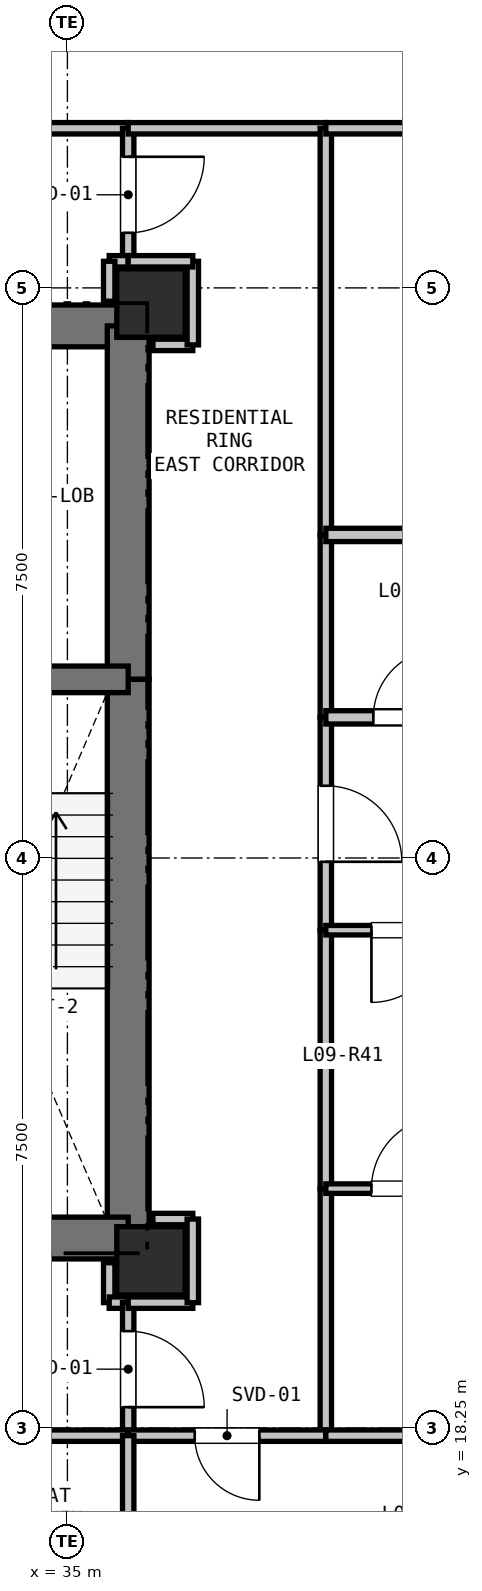
"""IFC4 building model, lengths in metres.
Left out: names, types, materials, properties, quantities, classifications, styles, units other than length and angle.
Written with IfcOpenShell. Run it as: python <this file> out.ifc"""

import sys

from ifc_helpers import new_model, si_unit, direction, frame, frame_2d, origin, origin_2d, place, context, subcontext, project, spatial, rectangle, extrude, element, fill, save


model = new_model("IFC4")
c1 = context("Model", 3, precision=1e-05, world=origin(), true_north=direction((0.0, 1.0)))
c2 = subcontext(c1, "Body", "Model", "MODEL_VIEW")
j1 = project(units=[si_unit("LENGTHUNIT", "METRE"), si_unit("PLANEANGLEUNIT", "RADIAN")], contexts=[c1])
p1 = place(None, origin())
s1 = spatial("IfcSite", under=j1, at=p1, CompositionType="ELEMENT")
p2 = place(p1, origin())
s2 = spatial("IfcBuilding", under=s1, at=p2, CompositionType="ELEMENT")
p3 = place(p2, frame((0.0, 0.0, 35.7)))
s3 = spatial("IfcBuildingStorey", under=s2, at=p3, CompositionType="ELEMENT", Elevation=35.7)
for number, where, z_axis, x_axis in (
    (1, (36.1, 33.05, 0.0), (0.0, 0.0, 1.0), (1.0, 0.0, 0.0)),
    (2, (36.1, 20.45, 0.0), (0.0, 0.0, 1.0), (1.0, 0.0, 0.0)),
):
    element("IfcColumn", number, at=place(p3, frame(where, z_axis=z_axis, x_axis=x_axis)), inside=s3, PredefinedType="COLUMN", context=c2, shape_type="SweptSolid", body=[
        extrude(rectangle(XDim=0.9, YDim=0.9, at=origin_2d()), origin(), (0.0, 0.0, 1.0), 3.3),
    ])
p4 = place(p3, frame((32.35, 32.75, 0.0), z_axis=(0.0, 0.0, 1.0), x_axis=(1.0, 0.0, 0.0)))
e3 = element("IfcWall", 3, at=p4, inside=s3, PredefinedType="SHEAR", context=c2, shape_type="SweptSolid", body=[
    extrude(rectangle(XDim=3.45, YDim=0.55, at=frame_2d((1.725, 0.0))), origin(), (0.0, 0.0, 1.0), 3.04),
])
p5 = place(p4, frame((0.65, 0.0, 0.0)))
e4 = element("IfcOpeningElement", 4, at=p5, cuts=e3, PredefinedType="OPENING", context=c2, shape_type="SweptSolid", body=[
    extrude(rectangle(XDim=1.15, YDim=2.15, at=frame_2d((0.575, 1.075))), frame((0.0, 0.285, 0.0), z_axis=(0.0, -1.0, 0.0), x_axis=(1.0, 0.0, 0.0)), (0.0, 0.0, 1.0), 0.57),
])
p6 = place(p3, frame((35.8, 32.75, 0.0), z_axis=(0.0, 0.0, 1.0), x_axis=(0.0, -1.0, 0.0)))
e5 = element("IfcWall", 5, at=p6, inside=s3, PredefinedType="SHEAR", context=c2, shape_type="SweptSolid", body=[
    extrude(rectangle(XDim=4.65, YDim=0.55, at=frame_2d((2.325, 0.0))), origin(), (0.0, 0.0, 1.0), 3.04),
])
p7 = place(p3, frame((35.8, 28.1, 0.0), z_axis=(0.0, 0.0, 1.0), x_axis=(0.0, -1.0, 0.0)))
e6 = element("IfcWall", 6, at=p7, inside=s3, PredefinedType="SHEAR", context=c2, shape_type="SweptSolid", body=[
    extrude(rectangle(XDim=7.35, YDim=0.55, at=frame_2d((3.675, 0.0))), origin(), (0.0, 0.0, 1.0), 3.04),
])
p8 = place(p3, frame((35.8, 20.75, 0.0), z_axis=(0.0, 0.0, 1.0), x_axis=(-1.0, 0.0, 0.0)))
e7 = element("IfcWall", 7, at=p8, inside=s3, PredefinedType="SHEAR", context=c2, shape_type="SweptSolid", body=[
    extrude(rectangle(XDim=3.45, YDim=0.55, at=frame_2d((1.725, 0.0))), origin(), (0.0, 0.0, 1.0), 3.04),
])
p9 = place(p3, frame((32.35, 28.1, 0.0), z_axis=(0.0, 0.0, 1.0), x_axis=(1.0, 0.0, 0.0)))
e8 = element("IfcWall", 8, at=p9, inside=s3, PredefinedType="SHEAR", context=c2, shape_type="SweptSolid", body=[
    extrude(rectangle(XDim=3.45, YDim=0.35, at=frame_2d((1.725, 0.0))), origin(), (0.0, 0.0, 1.0), 3.04),
])
p10 = place(p9, frame((1.15, 0.0, 0.0)))
e9 = element("IfcOpeningElement", 9, at=p10, cuts=e8, PredefinedType="OPENING", context=c2, shape_type="SweptSolid", body=[
    extrude(rectangle(XDim=1.15, YDim=2.15, at=frame_2d((0.575, 1.075))), frame((0.0, 0.185, 0.0), z_axis=(0.0, -1.0, 0.0), x_axis=(1.0, 0.0, 0.0)), (0.0, 0.0, 1.0), 0.37),
])
p11 = place(p3, frame((35.55, 20.425, 0.0), z_axis=(0.0, 0.0, 1.0), x_axis=(0.0, -1.0, 0.0)))
e10 = element("IfcWall", 10, at=p11, inside=s3, PredefinedType="PARTITIONING", context=c2, shape_type="SweptSolid", body=[
    extrude(rectangle(XDim=0.525, YDim=0.15, at=frame_2d((0.263, 0.0))), origin(), (0.0, 0.0, 1.0), 2.488),
])
p12 = place(p3, frame((35.55, 19.9, 0.0), z_axis=(0.0, 0.0, 1.0), x_axis=(1.0, 0.0, 0.0)))
e11 = element("IfcWall", 11, at=p12, inside=s3, PredefinedType="PARTITIONING", context=c2, shape_type="SweptSolid", body=[
    extrude(rectangle(XDim=0.25, YDim=0.15, at=frame_2d((0.125, 0.0))), origin(), (0.0, 0.0, 1.0), 3.04),
])
p13 = place(p3, frame((35.8, 19.9, 0.0), z_axis=(0.0, 0.0, 1.0), x_axis=(0.0, -1.0, 0.0)))
e12 = element("IfcWall", 12, at=p13, inside=s3, PredefinedType="PARTITIONING", context=c2, shape_type="SweptSolid", body=[
    extrude(rectangle(XDim=1.75, YDim=0.15, at=frame_2d((0.875, 0.0))), origin(), (0.0, 0.0, 1.0), 3.04),
])
p14 = place(p13, frame((0.375, 0.0, 0.0)))
e13 = element("IfcOpeningElement", 13, at=p14, cuts=e12, PredefinedType="OPENING", context=c2, shape_type="SweptSolid", body=[
    extrude(rectangle(XDim=1.0, YDim=2.15, at=frame_2d((0.5, 1.075))), frame((0.0, 0.085, 0.0), z_axis=(0.0, -1.0, 0.0), x_axis=(1.0, 0.0, 0.0)), (0.0, 0.0, 1.0), 0.17),
])
p15 = place(p3, frame((35.8, 18.15, 0.0), z_axis=(0.0, 0.0, 1.0), x_axis=(-1.0, 0.0, 0.0)))
e14 = element("IfcWall", 14, at=p15, inside=s3, PredefinedType="PARTITIONING", context=c2, shape_type="SweptSolid", body=[
    extrude(rectangle(XDim=3.6, YDim=0.15, at=frame_2d((1.8, 0.0))), origin(), (0.0, 0.0, 1.0), 3.04),
])
p16 = place(p3, frame((33.5, 35.35, 0.0), z_axis=(0.0, 0.0, 1.0), x_axis=(1.0, 0.0, 0.0)))
e15 = element("IfcWall", 15, at=p16, inside=s3, PredefinedType="PARTITIONING", context=c2, shape_type="SweptSolid", body=[
    extrude(rectangle(XDim=2.3, YDim=0.15, at=frame_2d((1.15, 0.0))), origin(), (0.0, 0.0, 1.0), 3.04),
])
p17 = place(p3, frame((35.8, 35.35, 0.0), z_axis=(0.0, 0.0, 1.0), x_axis=(0.0, -1.0, 0.0)))
e16 = element("IfcWall", 16, at=p17, inside=s3, PredefinedType="PARTITIONING", context=c2, shape_type="SweptSolid", body=[
    extrude(rectangle(XDim=1.75, YDim=0.15, at=frame_2d((0.875, 0.0))), origin(), (0.0, 0.0, 1.0), 3.04),
])
p18 = place(p17, frame((0.375, 0.0, 0.0)))
e17 = element("IfcOpeningElement", 17, at=p18, cuts=e16, PredefinedType="OPENING", context=c2, shape_type="SweptSolid", body=[
    extrude(rectangle(XDim=1.0, YDim=2.15, at=frame_2d((0.5, 1.075))), frame((0.0, 0.085, 0.0), z_axis=(0.0, -1.0, 0.0), x_axis=(1.0, 0.0, 0.0)), (0.0, 0.0, 1.0), 0.17),
])
p19 = place(p3, frame((35.8, 33.6, 0.0), z_axis=(0.0, 0.0, 1.0), x_axis=(-1.0, 0.0, 0.0)))
e18 = element("IfcWall", 18, at=p19, inside=s3, PredefinedType="PARTITIONING", context=c2, shape_type="SweptSolid", body=[
    extrude(rectangle(XDim=0.25, YDim=0.15, at=frame_2d((0.125, 0.0))), origin(), (0.0, 0.0, 1.0), 3.04),
])
p20 = place(p3, frame((35.55, 33.6, 0.0), z_axis=(0.0, 0.0, 1.0), x_axis=(0.0, -1.0, 0.0)))
e19 = element("IfcWall", 19, at=p20, inside=s3, PredefinedType="PARTITIONING", context=c2, shape_type="SweptSolid", body=[
    extrude(rectangle(XDim=0.525, YDim=0.15, at=frame_2d((0.263, 0.0))), origin(), (0.0, 0.0, 1.0), 2.488),
])
for number, where, z_axis, x_axis in (
    (20, (36.65, 21.0, 0.0), (0.0, 0.0, 1.0), (-1.0, 0.0, 0.0)),
    (21, (36.125, 32.5, 0.0), (0.0, 0.0, 1.0), (1.0, 0.0, 0.0)),
):
    element("IfcWall", number, at=place(p3, frame(where, z_axis=z_axis, x_axis=x_axis)), inside=s3, PredefinedType="PARTITIONING", context=c2, shape_type="SweptSolid", body=[
        extrude(rectangle(XDim=0.525, YDim=0.15, at=frame_2d((0.262, 0.0))), origin(), (0.0, 0.0, 1.0), 2.488),
    ])
p21 = place(p3, frame((36.65, 32.5, 0.0), z_axis=(0.0, 0.0, 1.0), x_axis=(0.0, 1.0, 0.0)))
e22 = element("IfcWall", 22, at=p21, inside=s3, PredefinedType="PARTITIONING", context=c2, shape_type="SweptSolid", body=[
    extrude(rectangle(XDim=1.1, YDim=0.15, at=frame_2d((0.55, 0.0))), origin(), (0.0, 0.0, 1.0), 2.338),
])
p22 = place(p3, frame((36.65, 33.6, 0.0), z_axis=(0.0, 0.0, 1.0), x_axis=(-1.0, 0.0, 0.0)))
e23 = element("IfcWall", 23, at=p22, inside=s3, PredefinedType="PARTITIONING", context=c2, shape_type="SweptSolid", body=[
    extrude(rectangle(XDim=0.85, YDim=0.15, at=frame_2d((0.425, 0.0))), origin(), (0.0, 0.0, 1.0), 2.338),
])
p23 = place(p3, frame((35.8, 35.35, 0.0), z_axis=(0.0, 0.0, 1.0), x_axis=(1.0, 0.0, 0.0)))
e24 = element("IfcWall", 24, at=p23, inside=s3, PredefinedType="PARTITIONING", context=c2, shape_type="SweptSolid", body=[
    extrude(rectangle(XDim=2.6, YDim=0.15, at=frame_2d((1.3, 0.0))), origin(), (0.0, 0.0, 1.0), 2.338),
])
p24 = place(p3, frame((38.4, 35.35, 0.0), z_axis=(0.0, 0.0, 1.0), x_axis=(0.0, -1.0, 0.0)))
e25 = element("IfcWall", 25, at=p24, inside=s3, PredefinedType="PARTITIONING", context=c2, shape_type="SweptSolid", body=[
    extrude(rectangle(XDim=5.35, YDim=0.15, at=frame_2d((2.675, 0.0))), origin(), (0.0, 0.0, 1.0), 2.338),
])
p25 = place(p3, frame((38.4, 30.0, 0.0), z_axis=(0.0, 0.0, 1.0), x_axis=(0.0, -1.0, 0.0)))
e26 = element("IfcWall", 26, at=p25, inside=s3, PredefinedType="PARTITIONING", context=c2, shape_type="SweptSolid", body=[
    extrude(rectangle(XDim=2.4, YDim=0.15, at=frame_2d((1.2, 0.0))), origin(), (0.0, 0.0, 1.0), 3.04),
])
p26 = place(p3, frame((38.4, 27.6, 0.0), z_axis=(0.0, 0.0, 1.0), x_axis=(0.0, -1.0, 0.0)))
e27 = element("IfcWall", 27, at=p26, inside=s3, PredefinedType="PARTITIONING", context=c2, shape_type="SweptSolid", body=[
    extrude(rectangle(XDim=2.8, YDim=0.15, at=frame_2d((1.4, 0.0))), origin(), (0.0, 0.0, 1.0), 3.04),
])
p27 = place(p26, frame((0.9, 0.0, 0.0)))
e28 = element("IfcOpeningElement", 28, at=p27, cuts=e27, PredefinedType="OPENING", context=c2, shape_type="SweptSolid", body=[
    extrude(rectangle(XDim=1.0, YDim=2.15, at=frame_2d((0.5, 1.075))), frame((0.0, 0.085, 0.0), z_axis=(0.0, -1.0, 0.0), x_axis=(1.0, 0.0, 0.0)), (0.0, 0.0, 1.0), 0.17),
])
p28 = place(p3, frame((38.4, 24.8, 0.0), z_axis=(0.0, 0.0, 1.0), x_axis=(0.0, -1.0, 0.0)))
e29 = element("IfcWall", 29, at=p28, inside=s3, PredefinedType="PARTITIONING", context=c2, shape_type="SweptSolid", body=[
    extrude(rectangle(XDim=3.4, YDim=0.15, at=frame_2d((1.7, 0.0))), origin(), (0.0, 0.0, 1.0), 3.04),
])
p29 = place(p3, frame((38.4, 21.4, 0.0), z_axis=(0.0, 0.0, 1.0), x_axis=(0.0, -1.0, 0.0)))
e30 = element("IfcWall", 30, at=p29, inside=s3, PredefinedType="PARTITIONING", context=c2, shape_type="SweptSolid", body=[
    extrude(rectangle(XDim=3.25, YDim=0.15, at=frame_2d((1.625, 0.0))), origin(), (0.0, 0.0, 1.0), 3.04),
])
p30 = place(p3, frame((38.4, 18.15, 0.0), z_axis=(0.0, 0.0, 1.0), x_axis=(-1.0, 0.0, 0.0)))
e31 = element("IfcWall", 31, at=p30, inside=s3, PredefinedType="PARTITIONING", context=c2, shape_type="SweptSolid", body=[
    extrude(rectangle(XDim=2.6, YDim=0.15, at=frame_2d((1.3, 0.0))), origin(), (0.0, 0.0, 1.0), 2.338),
])
p31 = place(p30, frame((0.875, 0.0, 0.0)))
e32 = element("IfcOpeningElement", 32, at=p31, cuts=e31, PredefinedType="OPENING", context=c2, shape_type="SweptSolid", body=[
    extrude(rectangle(XDim=0.85, YDim=2.1, at=frame_2d((0.425, 1.05))), frame((0.0, 0.085, 0.0), z_axis=(0.0, -1.0, 0.0), x_axis=(1.0, 0.0, 0.0)), (0.0, 0.0, 1.0), 0.17),
])
p32 = place(p3, frame((35.8, 19.9, 0.0), z_axis=(0.0, 0.0, 1.0), x_axis=(1.0, 0.0, 0.0)))
e33 = element("IfcWall", 33, at=p32, inside=s3, PredefinedType="PARTITIONING", context=c2, shape_type="SweptSolid", body=[
    extrude(rectangle(XDim=0.85, YDim=0.15, at=frame_2d((0.425, 0.0))), origin(), (0.0, 0.0, 1.0), 2.338),
])
p33 = place(p3, frame((36.65, 19.9, 0.0), z_axis=(0.0, 0.0, 1.0), x_axis=(0.0, 1.0, 0.0)))
e34 = element("IfcWall", 34, at=p33, inside=s3, PredefinedType="PARTITIONING", context=c2, shape_type="SweptSolid", body=[
    extrude(rectangle(XDim=1.1, YDim=0.15, at=frame_2d((0.55, 0.0))), origin(), (0.0, 0.0, 1.0), 3.04),
])
p34 = place(p3, frame((40.55, 24.8, 0.0), z_axis=(0.0, 0.0, 1.0), x_axis=(-1.0, 0.0, 0.0)))
e35 = element("IfcWall", 35, at=p34, inside=s3, PredefinedType="PARTITIONING", context=c2, shape_type="SweptSolid", body=[
    extrude(rectangle(XDim=2.15, YDim=0.125, at=frame_2d((1.075, 0.0))), origin(), (0.0, 0.0, 1.0), 3.04),
])
p35 = place(p34, frame((0.6, 0.0, 0.0)))
e36 = element("IfcOpeningElement", 36, at=p35, cuts=e35, PredefinedType="OPENING", context=c2, shape_type="SweptSolid", body=[
    extrude(rectangle(XDim=0.95, YDim=2.1, at=frame_2d((0.475, 1.05))), frame((0.0, 0.073, 0.0), z_axis=(0.0, -1.0, 0.0), x_axis=(1.0, 0.0, 0.0)), (0.0, 0.0, 1.0), 0.145),
])
p36 = place(p3, frame((38.4, 27.6, 0.0), z_axis=(0.0, 0.0, 1.0), x_axis=(1.0, 0.0, 0.0)))
e37 = element("IfcWall", 37, at=p36, inside=s3, PredefinedType="PLUMBINGWALL", context=c2, shape_type="SweptSolid", body=[
    extrude(rectangle(XDim=2.15, YDim=0.175, at=frame_2d((1.075, 0.0))), origin(), (0.0, 0.0, 1.0), 3.04),
])
p37 = place(p36, frame((0.625, 0.0, 0.0)))
e38 = element("IfcOpeningElement", 38, at=p37, cuts=e37, PredefinedType="OPENING", context=c2, shape_type="SweptSolid", body=[
    extrude(rectangle(XDim=0.9, YDim=2.1, at=frame_2d((0.45, 1.05))), frame((0.0, 0.097, 0.0), z_axis=(0.0, -1.0, 0.0), x_axis=(1.0, 0.0, 0.0)), (0.0, 0.0, 1.0), 0.195),
])
p38 = place(p3, frame((43.688, 35.35, 0.0), z_axis=(0.0, 0.0, 1.0), x_axis=(-1.0, 0.0, 0.0)))
e39 = element("IfcWall", 39, at=p38, inside=s3, PredefinedType="PARTITIONING", context=c2, shape_type="SweptSolid", body=[
    extrude(rectangle(XDim=5.289, YDim=0.15, at=frame_2d((2.644, 0.0))), origin(), (0.0, 0.0, 1.0), 2.338),
])
p39 = place(p3, frame((35.8, 18.15, 0.0), z_axis=(0.0, 0.0, 1.0), x_axis=(0.0, -1.0, 0.0)))
e40 = element("IfcWall", 40, at=p39, inside=s3, PredefinedType="PARTITIONING", context=c2, shape_type="SweptSolid", body=[
    extrude(rectangle(XDim=2.7, YDim=0.15, at=frame_2d((1.35, 0.0))), origin(), (0.0, 0.0, 1.0), 3.04),
])
p40 = place(p3, frame((38.4, 30.0, 0.0), z_axis=(0.0, 0.0, 1.0), x_axis=(1.0, 0.0, 0.0)))
e41 = element("IfcWall", 41, at=p40, inside=s3, PredefinedType="PLUMBINGWALL", context=c2, shape_type="SweptSolid", body=[
    extrude(rectangle(XDim=2.15, YDim=0.175, at=frame_2d((1.075, 0.0))), origin(), (0.0, 0.0, 1.0), 3.04),
])
p41 = place(p3, frame((38.4, 21.4, 0.0), z_axis=(0.0, 0.0, 1.0), x_axis=(1.0, 0.0, 0.0)))
e42 = element("IfcWall", 42, at=p41, inside=s3, PredefinedType="PARTITIONING", context=c2, shape_type="SweptSolid", body=[
    extrude(rectangle(XDim=2.15, YDim=0.125, at=frame_2d((1.075, 0.0))), origin(), (0.0, 0.0, 1.0), 3.04),
])
p42 = place(p41, frame((0.6, 0.0, 0.0)))
e43 = element("IfcOpeningElement", 43, at=p42, cuts=e42, PredefinedType="OPENING", context=c2, shape_type="SweptSolid", body=[
    extrude(rectangle(XDim=0.95, YDim=2.1, at=frame_2d((0.475, 1.05))), frame((0.0, 0.073, 0.0), z_axis=(0.0, -1.0, 0.0), x_axis=(1.0, 0.0, 0.0)), (0.0, 0.0, 1.0), 0.145),
])
p43 = place(p3, frame((43.688, 18.15, 0.0), z_axis=(0.0, 0.0, 1.0), x_axis=(-1.0, 0.0, 0.0)))
e44 = element("IfcWall", 44, at=p43, inside=s3, PredefinedType="PARTITIONING", context=c2, shape_type="SweptSolid", body=[
    extrude(rectangle(XDim=5.289, YDim=0.15, at=frame_2d((2.644, 0.0))), origin(), (0.0, 0.0, 1.0), 2.365),
])
p44 = place(p14, origin())
e45 = element("IfcDoor", 45, at=p44, inside=s3, OperationType="SINGLE_SWING_RIGHT", PredefinedType="DOOR", context=c2, shape_type="SweptSolid", body=[
    extrude(rectangle(XDim=1.0, YDim=2.15, at=frame_2d((0.5, 1.075))), frame((0.0, 0.025, 0.0), z_axis=(0.0, -1.0, 0.0), x_axis=(1.0, 0.0, 0.0)), (0.0, 0.0, 1.0), 0.05),
])
fill(e13, e45)
p45 = place(p18, origin())
e46 = element("IfcDoor", 46, at=p45, inside=s3, OperationType="SINGLE_SWING_LEFT", PredefinedType="DOOR", context=c2, shape_type="SweptSolid", body=[
    extrude(rectangle(XDim=1.0, YDim=2.15, at=frame_2d((0.5, 1.075))), frame((0.0, 0.025, 0.0), z_axis=(0.0, -1.0, 0.0), x_axis=(1.0, 0.0, 0.0)), (0.0, 0.0, 1.0), 0.05),
])
fill(e17, e46)
p46 = place(p27, origin())
e47 = element("IfcDoor", 47, at=p46, inside=s3, OperationType="SINGLE_SWING_RIGHT", PredefinedType="DOOR", context=c2, shape_type="SweptSolid", body=[
    extrude(rectangle(XDim=1.0, YDim=2.15, at=frame_2d((0.5, 1.075))), frame((0.0, 0.025, 0.0), z_axis=(0.0, -1.0, 0.0), x_axis=(1.0, 0.0, 0.0)), (0.0, 0.0, 1.0), 0.05),
])
fill(e28, e47)
p47 = place(p31, origin())
e48 = element("IfcDoor", 48, at=p47, inside=s3, OperationType="SINGLE_SWING_LEFT", PredefinedType="DOOR", context=c2, shape_type="SweptSolid", body=[
    extrude(rectangle(XDim=0.85, YDim=2.1, at=frame_2d((0.425, 1.05))), frame((0.0, 0.025, 0.0), z_axis=(0.0, -1.0, 0.0), x_axis=(1.0, 0.0, 0.0)), (0.0, 0.0, 1.0), 0.05),
])
fill(e32, e48)
p48 = place(p37, origin())
e49 = element("IfcDoor", 49, at=p48, inside=s3, OperationType="SINGLE_SWING_RIGHT", PredefinedType="DOOR", context=c2, shape_type="SweptSolid", body=[
    extrude(rectangle(XDim=0.9, YDim=2.1, at=frame_2d((0.45, 1.05))), frame((0.0, 0.025, 0.0), z_axis=(0.0, -1.0, 0.0), x_axis=(1.0, 0.0, 0.0)), (0.0, 0.0, 1.0), 0.05),
])
fill(e38, e49)
p49 = place(p35, origin())
e50 = element("IfcDoor", 50, at=p49, inside=s3, OperationType="SINGLE_SWING_RIGHT", PredefinedType="DOOR", context=c2, shape_type="SweptSolid", body=[
    extrude(rectangle(XDim=0.95, YDim=2.1, at=frame_2d((0.475, 1.05))), frame((0.0, 0.025, 0.0), z_axis=(0.0, -1.0, 0.0), x_axis=(1.0, 0.0, 0.0)), (0.0, 0.0, 1.0), 0.05),
])
fill(e36, e50)
p50 = place(p42, origin())
e51 = element("IfcDoor", 51, at=p50, inside=s3, OperationType="SINGLE_SWING_RIGHT", PredefinedType="DOOR", context=c2, shape_type="SweptSolid", body=[
    extrude(rectangle(XDim=0.95, YDim=2.1, at=frame_2d((0.475, 1.05))), frame((0.0, 0.025, 0.0), z_axis=(0.0, -1.0, 0.0), x_axis=(1.0, 0.0, 0.0)), (0.0, 0.0, 1.0), 0.05),
])
fill(e43, e51)
save(model, sys.argv[1])
